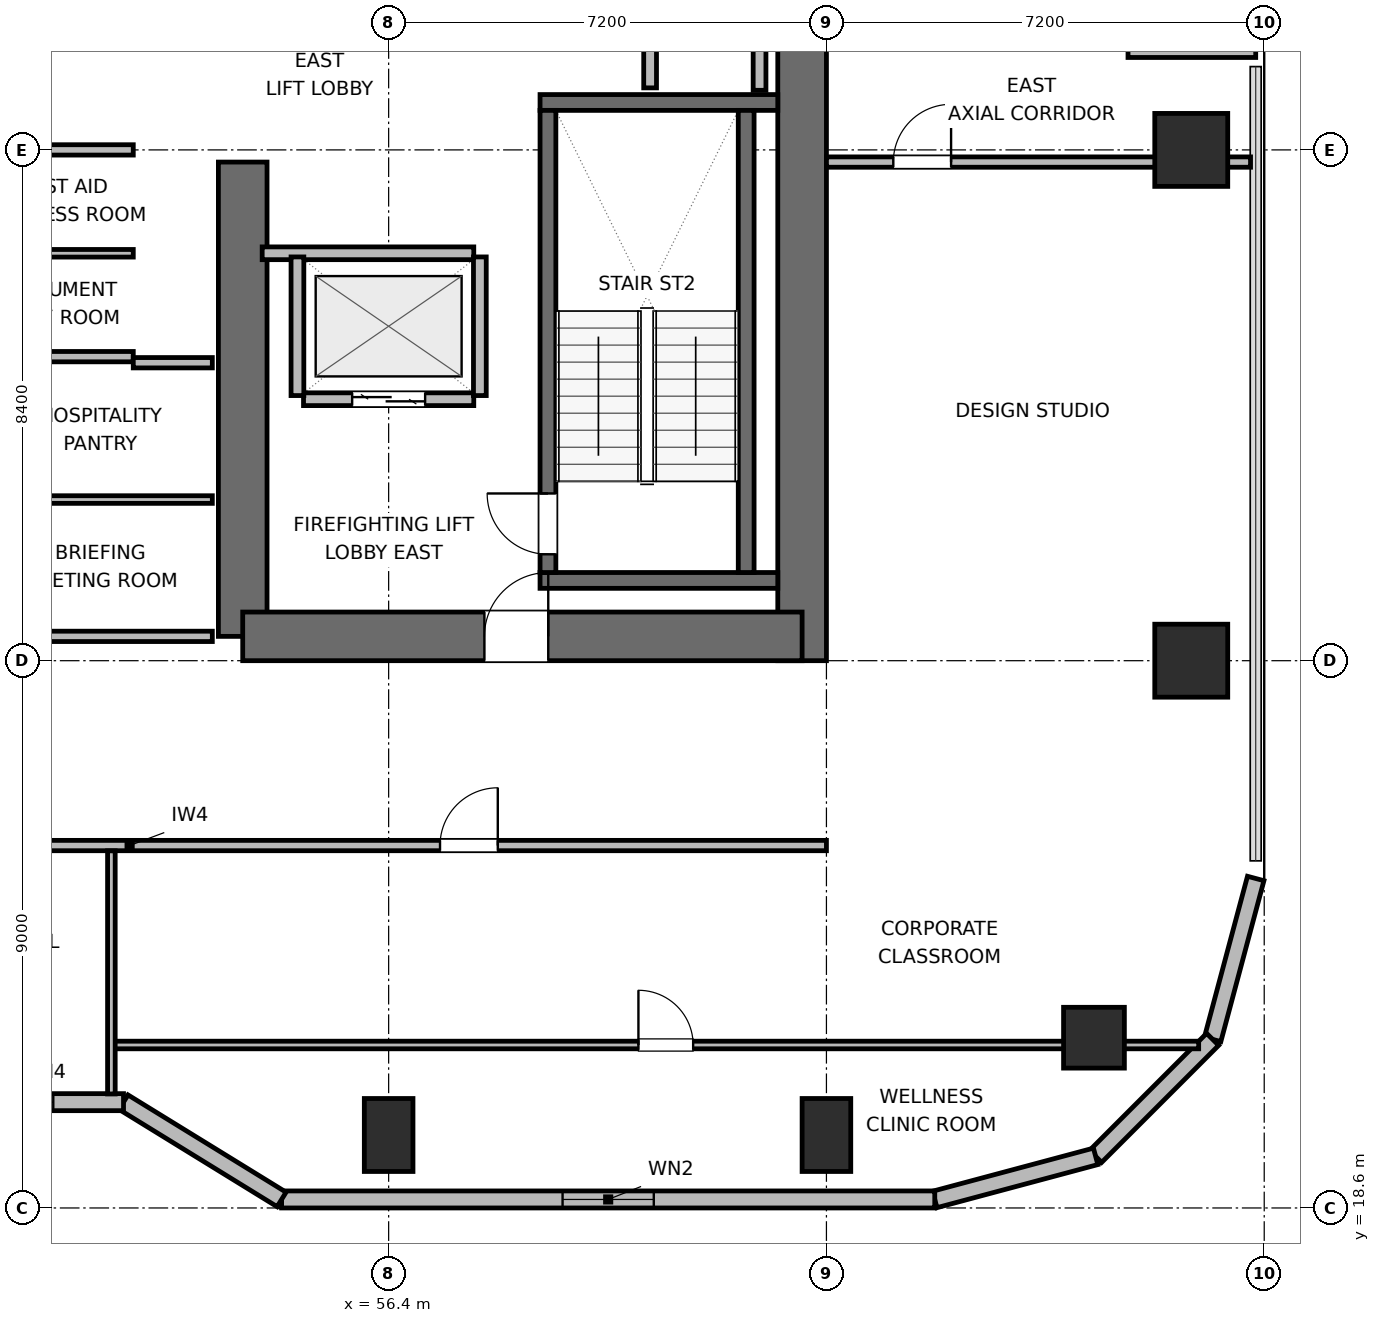
"""IFC4 building model, lengths in metres.
Left out: names, types, materials, properties, quantities, classifications, styles, units other than length and angle.
Written with IfcOpenShell. Run it as: python <this file> out.ifc"""

import sys

from ifc_helpers import new_model, si_unit, direction, frame, frame_2d, origin, origin_2d, place, context, subcontext, project, spatial, rectangle, circle, extrude, element, fill, save


model = new_model("IFC4")
c1 = context("Model", 3, precision=1e-05, world=origin(), true_north=direction((0.0, 1.0)))
c2 = subcontext(c1, "Body", "Model", "MODEL_VIEW")
j1 = project(units=[si_unit("LENGTHUNIT", "METRE"), si_unit("PLANEANGLEUNIT", "RADIAN")], contexts=[c1])
p1 = place(None, origin())
s1 = spatial("IfcSite", under=j1, at=p1, CompositionType="ELEMENT")
p2 = place(p1, origin())
s2 = spatial("IfcBuilding", under=s1, at=p2, CompositionType="ELEMENT")
p3 = place(p2, frame((0.0, 0.0, 174.0)))
s3 = spatial("IfcBuildingStorey", under=s2, at=p3, CompositionType="ELEMENT", Elevation=174.0)
p4 = place(p3, frame((54.0, 28.0, 0.0), z_axis=(0.0, 0.0, 1.0), x_axis=(0.0, 1.0, 0.0)))
e1 = element("IfcWall", 1, at=p4, inside=s3, PredefinedType="SHEAR", context=c2, shape_type="SweptSolid", body=[
    extrude(rectangle(XDim=7.8, YDim=0.8, at=frame_2d((3.9, 0.0))), origin(), (0.0, 0.0, 1.0), 3.9),
])
p5 = place(p3, frame((63.2, 27.6, 0.0), z_axis=(0.0, 0.0, 1.0), x_axis=(0.0, 1.0, 0.0)))
e2 = element("IfcWall", 2, at=p5, inside=s3, PredefinedType="SHEAR", context=c2, shape_type="SweptSolid", body=[
    extrude(rectangle(XDim=16.8, YDim=0.8, at=frame_2d((8.4, 0.0))), origin(), (0.0, 0.0, 1.0), 3.9),
])
p6 = place(p3, frame((54.0, 28.0, 0.0), z_axis=(0.0, 0.0, 1.0), x_axis=(1.0, 0.0, 0.0)))
e3 = element("IfcWall", 3, at=p6, inside=s3, PredefinedType="SHEAR", context=c2, shape_type="SweptSolid", body=[
    extrude(rectangle(XDim=9.2, YDim=0.8, at=frame_2d((4.6, 0.0))), origin(), (0.0, 0.0, 1.0), 3.9),
])
p7 = place(p6, frame((3.975, 0.0, 0.0)))
e4 = element("IfcOpeningElement", 4, at=p7, cuts=e3, PredefinedType="OPENING", context=c2, shape_type="SweptSolid", body=[
    extrude(rectangle(XDim=1.05, YDim=2.04, at=frame_2d((0.525, 1.02))), frame((0.0, 0.41, 0.0), z_axis=(0.0, -1.0, 0.0), x_axis=(1.0, 0.0, 0.0)), (0.0, 0.0, 1.0), 0.82),
])
for number, where, z_axis, x_axis in (
    (5, (58.89, 28.92, 0.0), (0.0, 0.0, 1.0), (1.0, 0.0, 0.0)),
    (6, (58.89, 36.78, 0.0), (0.0, 0.0, 1.0), (1.0, 0.0, 0.0)),
):
    element("IfcWall", number, at=place(p3, frame(where, z_axis=z_axis, x_axis=x_axis)), inside=s3, PredefinedType="SHEAR", context=c2, shape_type="SweptSolid", body=[
        extrude(rectangle(XDim=3.91, YDim=0.26, at=frame_2d((1.955, 0.0))), origin(), (0.0, 0.0, 1.0), 3.9),
    ])
p8 = place(p3, frame((59.02, 29.05, 0.0), z_axis=(0.0, 0.0, 1.0), x_axis=(0.0, 1.0, 0.0)))
e7 = element("IfcWall", 7, at=p8, inside=s3, PredefinedType="SHEAR", context=c2, shape_type="SweptSolid", body=[
    extrude(rectangle(XDim=7.6, YDim=0.26, at=frame_2d((3.8, 0.0))), origin(), (0.0, 0.0, 1.0), 3.9),
])
p9 = place(p8, frame((0.3, 0.0, 0.0)))
e8 = element("IfcOpeningElement", 8, at=p9, cuts=e7, PredefinedType="OPENING", context=c2, shape_type="SweptSolid", body=[
    extrude(rectangle(XDim=1.0, YDim=2.04, at=frame_2d((0.5, 1.02))), frame((0.0, 0.14, 0.0), z_axis=(0.0, -1.0, 0.0), x_axis=(1.0, 0.0, 0.0)), (0.0, 0.0, 1.0), 0.28),
])
p10 = place(p3, frame((62.28, 29.05, 0.0), z_axis=(0.0, 0.0, 1.0), x_axis=(0.0, 1.0, 0.0)))
e9 = element("IfcWall", 9, at=p10, inside=s3, PredefinedType="SHEAR", context=c2, shape_type="SweptSolid", body=[
    extrude(rectangle(XDim=7.6, YDim=0.26, at=frame_2d((3.8, 0.0))), origin(), (0.0, 0.0, 1.0), 3.9),
])
p11 = place(p3, frame((68.0, 21.4, 0.0), z_axis=(0.0, 0.0, 1.0), x_axis=(1.0, 0.0, 0.0)))
e10 = element("IfcColumn", 10, at=p11, inside=s3, PredefinedType="COLUMN", context=c2, shape_type="SweptSolid", body=[
    extrude(circle(Radius=0.5, at=origin_2d()), origin(), (0.0, 0.0, 1.0), 3.9),
])
for number, where, z_axis, x_axis in (
    (11, (56.4, 19.8, 0.0), (0.0, 0.0, 1.0), (1.0, 0.0, 0.0)),
    (12, (63.6, 19.8, 0.0), (0.0, 0.0, 1.0), (1.0, 0.0, 0.0)),
):
    element("IfcColumn", number, at=place(p3, frame(where, z_axis=z_axis, x_axis=x_axis)), inside=s3, PredefinedType="COLUMN", context=c2, shape_type="SweptSolid", body=[
        extrude(rectangle(XDim=0.8, YDim=1.2, at=origin_2d()), origin(), (0.0, 0.0, 1.0), 3.9),
    ])
for number, where, z_axis, x_axis in (
    (13, (69.6, 27.6, 0.0), (0.0, 0.0, 1.0), (1.0, 0.0, 0.0)),
    (14, (69.6, 36.0, 0.0), (0.0, 0.0, 1.0), (1.0, 0.0, 0.0)),
):
    element("IfcColumn", number, at=place(p3, frame(where, z_axis=z_axis, x_axis=x_axis)), inside=s3, PredefinedType="COLUMN", context=c2, shape_type="SweptSolid", body=[
        extrude(rectangle(XDim=1.2, YDim=1.2, at=origin_2d()), origin(), (0.0, 0.0, 1.0), 3.9),
    ])
p12 = place(p3, frame((68.56, 37.66, 0.0), z_axis=(0.0, 0.0, 1.0), x_axis=(1.0, 0.0, 0.0)))
e15 = element("IfcWall", 15, at=p12, inside=s3, PredefinedType="SOLIDWALL", context=c2, shape_type="SweptSolid", body=[
    extrude(rectangle(XDim=2.1, YDim=0.28, at=frame_2d((1.05, 0.0))), origin(), (0.0, 0.0, 1.0), 3.116),
])
p13 = place(p3, frame((70.66, 24.018, 0.0), z_axis=(0.0, 0.0, 1.0), x_axis=(-0.258672222976, -0.9659651552, 0.0)))
e16 = element("IfcWall", 16, at=p13, inside=s3, PredefinedType="SOLIDWALL", context=c2, shape_type="SweptSolid", body=[
    extrude(rectangle(XDim=2.739, YDim=0.28, at=frame_2d((1.37, 0.0))), origin(), (0.0, 0.0, 1.0), 3.68),
])
p14 = place(p3, frame((69.951, 21.373, 0.0), z_axis=(0.0, 0.0, 1.0), x_axis=(-0.707061915429, -0.707151644098, 0.0)))
e17 = element("IfcWall", 17, at=p14, inside=s3, PredefinedType="SOLIDWALL", context=c2, shape_type="SweptSolid", body=[
    extrude(rectangle(XDim=2.721, YDim=0.28, at=frame_2d((1.36, 0.0))), origin(), (0.0, 0.0, 1.0), 3.68),
])
p15 = place(p3, frame((68.028, 19.448, 0.0), z_axis=(0.0, 0.0, 1.0), x_axis=(-0.965971118627, -0.258649952598, 0.0)))
e18 = element("IfcWall", 18, at=p15, inside=s3, PredefinedType="SOLIDWALL", context=c2, shape_type="SweptSolid", body=[
    extrude(rectangle(XDim=2.739, YDim=0.28, at=frame_2d((1.37, 0.0))), origin(), (0.0, 0.0, 1.0), 3.68),
])
p16 = place(p3, frame((65.382, 18.74, 0.0), z_axis=(0.0, 0.0, 1.0), x_axis=(-1.0, 0.0, 0.0)))
e19 = element("IfcWall", 19, at=p16, inside=s3, PredefinedType="SOLIDWALL", context=c2, shape_type="SweptSolid", body=[
    extrude(rectangle(XDim=10.742, YDim=0.28, at=frame_2d((5.371, 0.0))), origin(), (0.0, 0.0, 1.0), 3.68),
])
p17 = place(p16, frame((4.621, 0.0, 0.85)))
e20 = element("IfcOpeningElement", 20, at=p17, cuts=e19, PredefinedType="OPENING", context=c2, shape_type="SweptSolid", body=[
    extrude(rectangle(XDim=1.5, YDim=1.1, at=frame_2d((0.75, 0.55))), frame((0.0, 0.15, 0.0), z_axis=(0.0, -1.0, 0.0), x_axis=(1.0, 0.0, 0.0)), (0.0, 0.0, 1.0), 0.3),
])
p18 = place(p3, frame((54.64, 18.74, 0.0), z_axis=(0.0, 0.0, 1.0), x_axis=(-0.851652825334, 0.524106349037, 0.0)))
e21 = element("IfcWall", 21, at=p18, inside=s3, PredefinedType="SOLIDWALL", context=c2, shape_type="SweptSolid", body=[
    extrude(rectangle(XDim=3.053, YDim=0.28, at=frame_2d((1.526, 0.0))), origin(), (0.0, 0.0, 1.0), 2.265),
])
p19 = place(p3, frame((52.04, 20.34, 0.0), z_axis=(0.0, 0.0, 1.0), x_axis=(-1.0, 0.0, 0.0)))
e22 = element("IfcWall", 22, at=p19, inside=s3, PredefinedType="SOLIDWALL", context=c2, shape_type="SweptSolid", body=[
    extrude(rectangle(XDim=4.699, YDim=0.28, at=frame_2d((2.35, 0.0))), origin(), (0.0, 0.0, 1.0), 2.265),
])
p20 = place(p19, frame((1.155, 0.0, 0.85)))
e23 = element("IfcOpeningElement", 23, at=p20, cuts=e22, PredefinedType="OPENING", context=c2, shape_type="SweptSolid", body=[
    extrude(rectangle(XDim=2.4, YDim=1.15, at=frame_2d((1.2, 0.575))), frame((0.0, 0.15, 0.0), z_axis=(0.0, -1.0, 0.0), x_axis=(1.0, 0.0, 0.0)), (0.0, 0.0, 1.0), 0.3),
])
p21 = place(p3, frame((60.7, 37.02, 0.0), z_axis=(0.0, 0.0, 1.0), x_axis=(0.0, 1.0, 0.0)))
e24 = element("IfcWall", 24, at=p21, inside=s3, PredefinedType="PARTITIONING", context=c2, shape_type="SweptSolid", body=[
    extrude(rectangle(XDim=1.96, YDim=0.21, at=frame_2d((0.98, 0.0))), origin(), (0.0, 0.0, 1.0), 3.68),
])
p22 = place(p3, frame((62.5, 36.98, 0.0), z_axis=(0.0, 0.0, 1.0), x_axis=(0.0, 1.0, 0.0)))
e25 = element("IfcWall", 25, at=p22, inside=s3, PredefinedType="PARTITIONING", context=c2, shape_type="SweptSolid", body=[
    extrude(rectangle(XDim=2.04, YDim=0.21, at=frame_2d((1.02, 0.0))), origin(), (0.0, 0.0, 1.0), 3.68),
])
p23 = place(p3, frame((55.0, 31.9, 0.0), z_axis=(0.0, 0.0, 1.0), x_axis=(1.0, 0.0, 0.0)))
e26 = element("IfcWall", 26, at=p23, inside=s3, PredefinedType="PARTITIONING", context=c2, shape_type="SweptSolid", body=[
    extrude(rectangle(XDim=2.8, YDim=0.21, at=frame_2d((1.4, 0.0))), origin(), (0.0, 0.0, 1.0), 3.68),
])
p24 = place(p23, frame((0.8, 0.0, 0.0)))
e27 = element("IfcOpeningElement", 27, at=p24, cuts=e26, PredefinedType="OPENING", context=c2, shape_type="SweptSolid", body=[
    extrude(rectangle(XDim=1.2, YDim=2.04, at=frame_2d((0.6, 1.02))), frame((0.0, 0.115, 0.0), z_axis=(0.0, -1.0, 0.0), x_axis=(1.0, 0.0, 0.0)), (0.0, 0.0, 1.0), 0.23),
])
p25 = place(p3, frame((54.32, 34.3, 0.0), z_axis=(0.0, 0.0, 1.0), x_axis=(1.0, 0.0, 0.0)))
e28 = element("IfcWall", 28, at=p25, inside=s3, PredefinedType="PARTITIONING", context=c2, shape_type="SweptSolid", body=[
    extrude(rectangle(XDim=3.48, YDim=0.21, at=frame_2d((1.74, 0.0))), origin(), (0.0, 0.0, 1.0), 3.68),
])
for number, where, z_axis, x_axis in (
    (29, (54.9, 31.96, 0.0), (0.0, 0.0, 1.0), (0.0, 1.0, 0.0)),
    (30, (57.9, 31.96, 0.0), (0.0, 0.0, 1.0), (0.0, 1.0, 0.0)),
):
    element("IfcWall", number, at=place(p3, frame(where, z_axis=z_axis, x_axis=x_axis)), inside=s3, PredefinedType="PARTITIONING", context=c2, shape_type="SweptSolid", body=[
        extrude(rectangle(XDim=2.28, YDim=0.21, at=frame_2d((1.14, 0.0))), origin(), (0.0, 0.0, 1.0), 3.68),
    ])
for number, where, z_axis, x_axis in (
    (31, (49.287, 32.6, 0.0), (0.0, 0.0, 1.0), (1.0, 0.0, 0.0)),
    (32, (49.287, 36.0, 0.0), (0.0, 0.0, 1.0), (1.0, 0.0, 0.0)),
):
    element("IfcWall", number, at=place(p3, frame(where, z_axis=z_axis, x_axis=x_axis)), inside=s3, PredefinedType="PARTITIONING", context=c2, shape_type="SweptSolid", body=[
        extrude(rectangle(XDim=2.913, YDim=0.17, at=frame_2d((1.457, 0.0))), origin(), (0.0, 0.0, 1.0), 3.68),
    ])
p26 = place(p3, frame((49.287, 34.3, 0.0), z_axis=(0.0, 0.0, 1.0), x_axis=(1.0, 0.0, 0.0)))
e33 = element("IfcWall", 33, at=p26, inside=s3, PredefinedType="PARTITIONING", context=c2, shape_type="SweptSolid", body=[
    extrude(rectangle(XDim=2.913, YDim=0.125, at=frame_2d((1.457, 0.0))), origin(), (0.0, 0.0, 1.0), 3.68),
])
p27 = place(p3, frame((49.287, 28.0, 0.0), z_axis=(0.0, 0.0, 1.0), x_axis=(1.0, 0.0, 0.0)))
e34 = element("IfcWall", 34, at=p27, inside=s3, PredefinedType="PARTITIONING", context=c2, shape_type="SweptSolid", body=[
    extrude(rectangle(XDim=4.213, YDim=0.17, at=frame_2d((2.106, 0.0))), origin(), (0.0, 0.0, 1.0), 2.765),
])
p28 = place(p3, frame((52.2, 32.5, 0.0), z_axis=(0.0, 0.0, 1.0), x_axis=(1.0, 0.0, 0.0)))
e35 = element("IfcWall", 35, at=p28, inside=s3, PredefinedType="PARTITIONING", context=c2, shape_type="SweptSolid", body=[
    extrude(rectangle(XDim=1.3, YDim=0.17, at=frame_2d((0.65, 0.0))), origin(), (0.0, 0.0, 1.0), 3.68),
])
p29 = place(p3, frame((49.287, 30.25, 0.0), z_axis=(0.0, 0.0, 1.0), x_axis=(1.0, 0.0, 0.0)))
e36 = element("IfcWall", 36, at=p29, inside=s3, PredefinedType="PARTITIONING", context=c2, shape_type="SweptSolid", body=[
    extrude(rectangle(XDim=4.213, YDim=0.125, at=frame_2d((2.106, 0.0))), origin(), (0.0, 0.0, 1.0), 3.68),
])
p30 = place(p3, frame((29.525, 24.56, 0.0), z_axis=(0.0, 0.0, 1.0), x_axis=(1.0, 0.0, 0.0)))
e37 = element("IfcWall", 37, at=p30, inside=s3, PredefinedType="PARTITIONING", context=c2, shape_type="SweptSolid", body=[
    extrude(rectangle(XDim=34.075, YDim=0.17, at=frame_2d((17.038, 0.0))), origin(), (0.0, 0.0, 1.0), 3.68),
])
p31 = place(p30, frame((5.403, 0.0, 0.0)))
e38 = element("IfcOpeningElement", 38, at=p31, cuts=e37, PredefinedType="OPENING", context=c2, shape_type="SweptSolid", body=[
    extrude(rectangle(XDim=0.95, YDim=2.04, at=frame_2d((0.475, 1.02))), frame((0.0, 0.095, 0.0), z_axis=(0.0, -1.0, 0.0), x_axis=(1.0, 0.0, 0.0)), (0.0, 0.0, 1.0), 0.19),
])
p32 = place(p30, frame((16.56, 0.0, 0.0)))
e39 = element("IfcOpeningElement", 39, at=p32, cuts=e37, PredefinedType="OPENING", context=c2, shape_type="SweptSolid", body=[
    extrude(rectangle(XDim=0.95, YDim=2.04, at=frame_2d((0.475, 1.02))), frame((0.0, 0.095, 0.0), z_axis=(0.0, -1.0, 0.0), x_axis=(1.0, 0.0, 0.0)), (0.0, 0.0, 1.0), 0.19),
])
p33 = place(p30, frame((27.72, 0.0, 0.0)))
e40 = element("IfcOpeningElement", 40, at=p33, cuts=e37, PredefinedType="OPENING", context=c2, shape_type="SweptSolid", body=[
    extrude(rectangle(XDim=0.95, YDim=2.04, at=frame_2d((0.475, 1.02))), frame((0.0, 0.095, 0.0), z_axis=(0.0, -1.0, 0.0), x_axis=(1.0, 0.0, 0.0)), (0.0, 0.0, 1.0), 0.19),
])
p34 = place(p3, frame((51.84, 21.28, 0.0), z_axis=(0.0, 0.0, 1.0), x_axis=(1.0, 0.0, 0.0)))
e41 = element("IfcWall", 41, at=p34, inside=s3, PredefinedType="PARTITIONING", context=c2, shape_type="SweptSolid", body=[
    extrude(rectangle(XDim=17.882, YDim=0.125, at=frame_2d((8.941, 0.0))), origin(), (0.0, 0.0, 1.0), 2.265),
])
p35 = place(p34, frame((8.668, 0.0, 0.0)))
e42 = element("IfcOpeningElement", 42, at=p35, cuts=e41, PredefinedType="OPENING", context=c2, shape_type="SweptSolid", body=[
    extrude(rectangle(XDim=0.9, YDim=2.02, at=frame_2d((0.45, 1.01))), frame((0.0, 0.073, 0.0), z_axis=(0.0, -1.0, 0.0), x_axis=(1.0, 0.0, 0.0)), (0.0, 0.0, 1.0), 0.145),
])
p36 = place(p3, frame((51.84, 20.475, 0.0), z_axis=(0.0, 0.0, 1.0), x_axis=(0.0, 1.0, 0.0)))
e43 = element("IfcWall", 43, at=p36, inside=s3, PredefinedType="PARTITIONING", context=c2, shape_type="SweptSolid", body=[
    extrude(rectangle(XDim=3.998, YDim=0.125, at=frame_2d((1.999, 0.0))), origin(), (0.0, 0.0, 1.0), 3.68),
])
p37 = place(p3, frame((63.6, 35.8, 0.0), z_axis=(0.0, 0.0, 1.0), x_axis=(1.0, 0.0, 0.0)))
e44 = element("IfcWall", 44, at=p37, inside=s3, PredefinedType="PARTITIONING", context=c2, shape_type="SweptSolid", body=[
    extrude(rectangle(XDim=6.975, YDim=0.17, at=frame_2d((3.487, 0.0))), origin(), (0.0, 0.0, 1.0), 3.043),
])
p38 = place(p37, frame((1.1, 0.0, 0.0)))
e45 = element("IfcOpeningElement", 45, at=p38, cuts=e44, PredefinedType="OPENING", context=c2, shape_type="SweptSolid", body=[
    extrude(rectangle(XDim=0.95, YDim=2.04, at=frame_2d((0.475, 1.02))), frame((0.0, 0.095, 0.0), z_axis=(0.0, -1.0, 0.0), x_axis=(1.0, 0.0, 0.0)), (0.0, 0.0, 1.0), 0.19),
])
p39 = place(p17, origin())
e46 = element("IfcWindow", 46, at=p39, inside=s3, PartitioningType="SINGLE_PANEL", PredefinedType="WINDOW", context=c2, shape_type="SweptSolid", body=[
    extrude(rectangle(XDim=1.5, YDim=1.1, at=frame_2d((0.75, 0.55))), frame((0.0, 0.03, 0.0), z_axis=(0.0, -1.0, 0.0), x_axis=(1.0, 0.0, 0.0)), (0.0, 0.0, 1.0), 0.06),
])
fill(e20, e46)
p40 = place(p20, origin())
e47 = element("IfcWindow", 47, at=p40, inside=s3, PartitioningType="SINGLE_PANEL", PredefinedType="WINDOW", context=c2, shape_type="SweptSolid", body=[
    extrude(rectangle(XDim=2.4, YDim=1.15, at=frame_2d((1.2, 0.575))), frame((0.0, 0.03, 0.0), z_axis=(0.0, -1.0, 0.0), x_axis=(1.0, 0.0, 0.0)), (0.0, 0.0, 1.0), 0.06),
])
fill(e23, e47)
p41 = place(p9, origin())
e48 = element("IfcDoor", 48, at=p41, inside=s3, OperationType="SINGLE_SWING_RIGHT", PredefinedType="DOOR", context=c2, shape_type="SweptSolid", body=[
    extrude(rectangle(XDim=1.0, YDim=2.04, at=frame_2d((0.5, 1.02))), frame((0.0, 0.025, 0.0), z_axis=(0.0, -1.0, 0.0), x_axis=(1.0, 0.0, 0.0)), (0.0, 0.0, 1.0), 0.05),
])
fill(e8, e48)
p42 = place(p24, origin())
e49 = element("IfcDoor", 49, at=p42, inside=s3, OperationType="DOUBLE_DOOR_SLIDING", PredefinedType="DOOR", context=c2, shape_type="SweptSolid", body=[
    extrude(rectangle(XDim=1.2, YDim=2.04, at=frame_2d((0.6, 1.02))), frame((0.0, 0.025, 0.0), z_axis=(0.0, -1.0, 0.0), x_axis=(1.0, 0.0, 0.0)), (0.0, 0.0, 1.0), 0.05),
])
fill(e27, e49)
p43 = place(p7, origin())
e50 = element("IfcDoor", 50, at=p43, inside=s3, OperationType="SINGLE_SWING_RIGHT", PredefinedType="DOOR", context=c2, shape_type="SweptSolid", body=[
    extrude(rectangle(XDim=1.05, YDim=2.04, at=frame_2d((0.525, 1.02))), frame((0.0, 0.025, 0.0), z_axis=(0.0, -1.0, 0.0), x_axis=(1.0, 0.0, 0.0)), (0.0, 0.0, 1.0), 0.05),
])
fill(e4, e50)
p44 = place(p35, origin())
e51 = element("IfcDoor", 51, at=p44, inside=s3, OperationType="SINGLE_SWING_LEFT", PredefinedType="DOOR", context=c2, shape_type="SweptSolid", body=[
    extrude(rectangle(XDim=0.9, YDim=2.02, at=frame_2d((0.45, 1.01))), frame((0.0, 0.025, 0.0), z_axis=(0.0, -1.0, 0.0), x_axis=(1.0, 0.0, 0.0)), (0.0, 0.0, 1.0), 0.05),
])
fill(e42, e51)
p45 = place(p33, origin())
e52 = element("IfcDoor", 52, at=p45, inside=s3, OperationType="SINGLE_SWING_RIGHT", PredefinedType="DOOR", context=c2, shape_type="SweptSolid", body=[
    extrude(rectangle(XDim=0.95, YDim=2.04, at=frame_2d((0.475, 1.02))), frame((0.0, 0.025, 0.0), z_axis=(0.0, -1.0, 0.0), x_axis=(1.0, 0.0, 0.0)), (0.0, 0.0, 1.0), 0.05),
])
fill(e40, e52)
p46 = place(p38, origin())
e53 = element("IfcDoor", 53, at=p46, inside=s3, OperationType="SINGLE_SWING_RIGHT", PredefinedType="DOOR", context=c2, shape_type="SweptSolid", body=[
    extrude(rectangle(XDim=0.95, YDim=2.04, at=frame_2d((0.475, 1.02))), frame((0.0, 0.025, 0.0), z_axis=(0.0, -1.0, 0.0), x_axis=(1.0, 0.0, 0.0)), (0.0, 0.0, 1.0), 0.05),
])
fill(e45, e53)
save(model, sys.argv[1])
